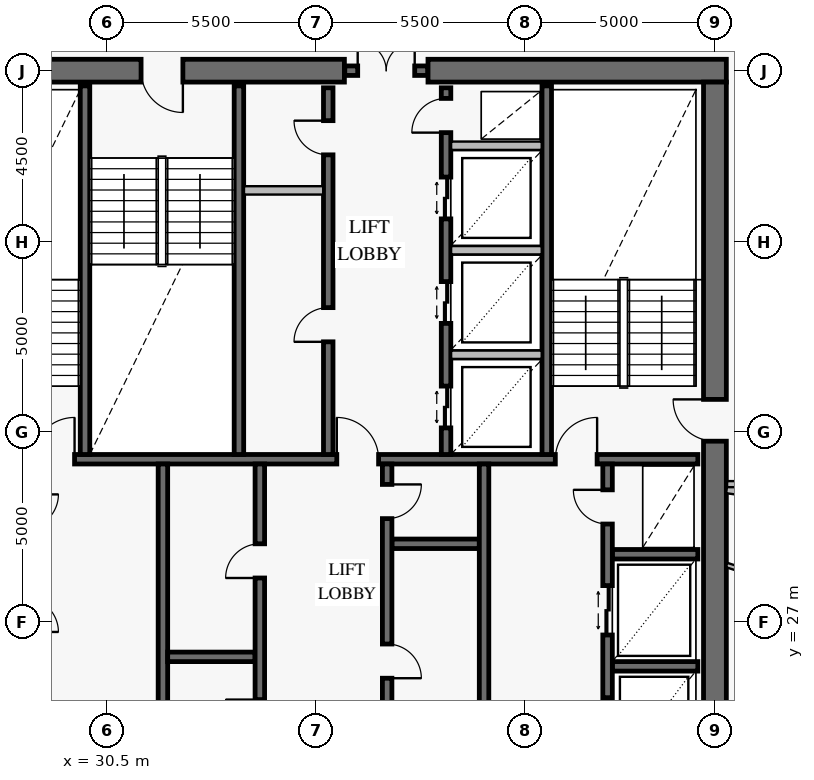
"""IFC4 building model, lengths in metres.
Left out: names, types, materials, properties, quantities, classifications, styles, units other than length and angle.
Written with IfcOpenShell. Run it as: python <this file> out.ifc"""

import sys

from ifc_helpers import new_model, si_unit, direction, frame, frame_2d, origin, place, context, subcontext, project, spatial, rectangle, extrude, element, fill, save


model = new_model("IFC4")
c1 = context("Model", 3, precision=1e-05, world=origin(), true_north=direction((0.0, 1.0)))
c2 = subcontext(c1, "Body", "Model", "MODEL_VIEW")
j1 = project(units=[si_unit("LENGTHUNIT", "METRE"), si_unit("PLANEANGLEUNIT", "RADIAN")], contexts=[c1])
p1 = place(None, origin())
s1 = spatial("IfcSite", under=j1, at=p1, CompositionType="ELEMENT")
p2 = place(p1, origin())
s2 = spatial("IfcBuilding", under=s1, at=p2, CompositionType="ELEMENT")
p3 = place(p2, frame((0.0, 0.0, 231.2)))
s3 = spatial("IfcBuildingStorey", under=s2, at=p3, CompositionType="ELEMENT", Elevation=231.2)
p4 = place(p3, frame((46.8, 41.5, 0.0), z_axis=(0.0, 0.0, 1.0), x_axis=(-1.0, 0.0, 0.0)))
e1 = element("IfcWall", 1, at=p4, inside=s3, PredefinedType="SHEAR", context=c2, shape_type="SweptSolid", body=[
    extrude(rectangle(XDim=7.85, YDim=0.6, at=frame_2d((3.925, 0.0))), origin(), (0.0, 0.0, 1.0), 3.8),
])
p5 = place(p3, frame((36.75, 41.5, 0.0), z_axis=(0.0, 0.0, 1.0), x_axis=(-1.0, 0.0, 0.0)))
e2 = element("IfcWall", 2, at=p5, inside=s3, PredefinedType="SHEAR", context=c2, shape_type="SweptSolid", body=[
    extrude(rectangle(XDim=11.55, YDim=0.6, at=frame_2d((5.775, 0.0))), origin(), (0.0, 0.0, 1.0), 3.8),
])
p6 = place(p5, frame((4.25, 0.0, 0.0)))
e3 = element("IfcOpeningElement", 3, at=p6, cuts=e2, PredefinedType="OPENING", context=c2, shape_type="SweptSolid", body=[
    extrude(rectangle(XDim=1.1, YDim=2.15, at=frame_2d((0.55, 1.075))), frame((0.0, 0.312, 0.0), z_axis=(0.0, -1.0, 0.0), x_axis=(1.0, 0.0, 0.0)), (0.0, 0.0, 1.0), 0.624),
])
p7 = place(p3, frame((46.5, 22.8, 0.0), z_axis=(0.0, 0.0, 1.0), x_axis=(0.0, 1.0, 0.0)))
e4 = element("IfcWall", 4, at=p7, inside=s3, PredefinedType="SHEAR", context=c2, shape_type="SweptSolid", body=[
    extrude(rectangle(XDim=18.4, YDim=0.6, at=frame_2d((9.2, 0.0))), origin(), (0.0, 0.0, 1.0), 3.8),
])
p8 = place(p7, frame((8.95, 0.0, 0.0)))
e5 = element("IfcOpeningElement", 5, at=p8, cuts=e4, PredefinedType="OPENING", context=c2, shape_type="SweptSolid", body=[
    extrude(rectangle(XDim=1.1, YDim=2.15, at=frame_2d((0.55, 1.075))), frame((0.0, 0.312, 0.0), z_axis=(0.0, -1.0, 0.0), x_axis=(1.0, 0.0, 0.0)), (0.0, 0.0, 1.0), 0.624),
])
p9 = place(p3, frame((36.76, 41.5, 0.0), z_axis=(0.0, 0.0, 1.0), x_axis=(1.0, 0.0, 0.0)))
e6 = element("IfcWall", 6, at=p9, inside=s3, PredefinedType="SOLIDWALL", context=c2, shape_type="SweptSolid", body=[
    extrude(rectangle(XDim=2.18, YDim=0.25, at=frame_2d((1.09, 0.0))), origin(), (0.0, 0.0, 1.0), 3.8),
])
p10 = place(p9, frame((0.34, 0.0, 0.0)))
e7 = element("IfcOpeningElement", 7, at=p10, cuts=e6, PredefinedType="OPENING", context=c2, shape_type="SweptSolid", body=[
    extrude(rectangle(XDim=1.5, YDim=2.15, at=frame_2d((0.75, 1.075))), frame((0.0, 0.137, 0.0), z_axis=(0.0, -1.0, 0.0), x_axis=(1.0, 0.0, 0.0)), (0.0, 0.0, 1.0), 0.274),
])
p11 = place(p3, frame((25.95, 31.275, 0.0), z_axis=(0.0, 0.0, 1.0), x_axis=(1.0, 0.0, 0.0)))
e8 = element("IfcWall", 8, at=p11, inside=s3, PredefinedType="SOLIDWALL", context=c2, shape_type="SweptSolid", body=[
    extrude(rectangle(XDim=20.1, YDim=0.25, at=frame_2d((10.05, 0.0))), origin(), (0.0, 0.0, 1.0), 3.8),
])
p12 = place(p11, frame((2.6, 0.0, 0.0)))
e9 = element("IfcOpeningElement", 9, at=p12, cuts=e8, PredefinedType="OPENING", context=c2, shape_type="SweptSolid", body=[
    extrude(rectangle(XDim=1.1, YDim=2.15, at=frame_2d((0.55, 1.075))), frame((0.0, 0.137, 0.0), z_axis=(0.0, -1.0, 0.0), x_axis=(1.0, 0.0, 0.0)), (0.0, 0.0, 1.0), 0.274),
])
p13 = place(p11, frame((10.6, 0.0, 0.0)))
e10 = element("IfcOpeningElement", 10, at=p13, cuts=e8, PredefinedType="OPENING", context=c2, shape_type="SweptSolid", body=[
    extrude(rectangle(XDim=1.1, YDim=2.15, at=frame_2d((0.55, 1.075))), frame((0.0, 0.137, 0.0), z_axis=(0.0, -1.0, 0.0), x_axis=(1.0, 0.0, 0.0)), (0.0, 0.0, 1.0), 0.274),
])
p14 = place(p11, frame((16.35, 0.0, 0.0)))
e11 = element("IfcOpeningElement", 11, at=p14, cuts=e8, PredefinedType="OPENING", context=c2, shape_type="SweptSolid", body=[
    extrude(rectangle(XDim=1.1, YDim=2.15, at=frame_2d((0.55, 1.075))), frame((0.0, 0.137, 0.0), z_axis=(0.0, -1.0, 0.0), x_axis=(1.0, 0.0, 0.0)), (0.0, 0.0, 1.0), 0.274),
])
for number, where, z_axis, x_axis in (
    (12, (29.925, 31.4, 0.0), (0.0, 0.0, 1.0), (0.0, 1.0, 0.0)),
    (13, (33.975, 31.4, 0.0), (0.0, 0.0, 1.0), (0.0, 1.0, 0.0)),
    (14, (42.075, 31.4, 0.0), (0.0, 0.0, 1.0), (0.0, 1.0, 0.0)),
):
    element("IfcWall", number, at=place(p3, frame(where, z_axis=z_axis, x_axis=x_axis)), inside=s3, PredefinedType="SOLIDWALL", context=c2, shape_type="SweptSolid", body=[
        extrude(rectangle(XDim=9.7, YDim=0.25, at=frame_2d((4.85, 0.0))), origin(), (0.0, 0.0, 1.0), 3.8),
    ])
p15 = place(p3, frame((36.325, 31.4, 0.0), z_axis=(0.0, 0.0, 1.0), x_axis=(0.0, 1.0, 0.0)))
e15 = element("IfcWall", 15, at=p15, inside=s3, PredefinedType="SOLIDWALL", context=c2, shape_type="SweptSolid", body=[
    extrude(rectangle(XDim=9.65, YDim=0.25, at=frame_2d((4.825, 0.0))), origin(), (0.0, 0.0, 1.0), 3.8),
])
p16 = place(p15, frame((2.965, 0.0, 0.0)))
e16 = element("IfcOpeningElement", 16, at=p16, cuts=e15, PredefinedType="OPENING", context=c2, shape_type="SweptSolid", body=[
    extrude(rectangle(XDim=0.9, YDim=2.1, at=frame_2d((0.45, 1.05))), frame((0.0, 0.137, 0.0), z_axis=(0.0, -1.0, 0.0), x_axis=(1.0, 0.0, 0.0)), (0.0, 0.0, 1.0), 0.274),
])
p17 = place(p15, frame((7.885, 0.0, 0.0)))
e17 = element("IfcOpeningElement", 17, at=p17, cuts=e15, PredefinedType="OPENING", context=c2, shape_type="SweptSolid", body=[
    extrude(rectangle(XDim=0.9, YDim=2.1, at=frame_2d((0.45, 1.05))), frame((0.0, 0.137, 0.0), z_axis=(0.0, -1.0, 0.0), x_axis=(1.0, 0.0, 0.0)), (0.0, 0.0, 1.0), 0.274),
])
p18 = place(p3, frame((39.425, 31.4, 0.0), z_axis=(0.0, 0.0, 1.0), x_axis=(0.0, 1.0, 0.0)))
e18 = element("IfcWall", 18, at=p18, inside=s3, PredefinedType="SOLIDWALL", context=c2, shape_type="SweptSolid", body=[
    extrude(rectangle(XDim=9.65, YDim=0.25, at=frame_2d((4.825, 0.0))), origin(), (0.0, 0.0, 1.0), 3.8),
])
p19 = place(p18, frame((0.7, 0.0, 0.0)))
e19 = element("IfcOpeningElement", 19, at=p19, cuts=e18, PredefinedType="OPENING", context=c2, shape_type="SweptSolid", body=[
    extrude(rectangle(XDim=1.1, YDim=2.2, at=frame_2d((0.55, 1.1))), frame((0.0, 0.137, 0.0), z_axis=(0.0, -1.0, 0.0), x_axis=(1.0, 0.0, 0.0)), (0.0, 0.0, 1.0), 0.274),
])
p20 = place(p18, frame((3.45, 0.0, 0.0)))
e20 = element("IfcOpeningElement", 20, at=p20, cuts=e18, PredefinedType="OPENING", context=c2, shape_type="SweptSolid", body=[
    extrude(rectangle(XDim=1.1, YDim=2.2, at=frame_2d((0.55, 1.1))), frame((0.0, 0.137, 0.0), z_axis=(0.0, -1.0, 0.0), x_axis=(1.0, 0.0, 0.0)), (0.0, 0.0, 1.0), 0.274),
])
p21 = place(p18, frame((6.2, 0.0, 0.0)))
e21 = element("IfcOpeningElement", 21, at=p21, cuts=e18, PredefinedType="OPENING", context=c2, shape_type="SweptSolid", body=[
    extrude(rectangle(XDim=1.1, YDim=2.2, at=frame_2d((0.55, 1.1))), frame((0.0, 0.137, 0.0), z_axis=(0.0, -1.0, 0.0), x_axis=(1.0, 0.0, 0.0)), (0.0, 0.0, 1.0), 0.274),
])
p22 = place(p18, frame((8.47, 0.0, 0.0)))
e22 = element("IfcOpeningElement", 22, at=p22, cuts=e18, PredefinedType="OPENING", context=c2, shape_type="SweptSolid", body=[
    extrude(rectangle(XDim=0.9, YDim=2.1, at=frame_2d((0.45, 1.05))), frame((0.0, 0.137, 0.0), z_axis=(0.0, -1.0, 0.0), x_axis=(1.0, 0.0, 0.0)), (0.0, 0.0, 1.0), 0.274),
])
p23 = place(p3, frame((31.975, 22.95, 0.0), z_axis=(0.0, 0.0, 1.0), x_axis=(0.0, 1.0, 0.0)))
e23 = element("IfcWall", 23, at=p23, inside=s3, PredefinedType="SOLIDWALL", context=c2, shape_type="SweptSolid", body=[
    extrude(rectangle(XDim=8.2, YDim=0.25, at=frame_2d((4.1, 0.0))), origin(), (0.0, 0.0, 1.0), 3.8),
])
p24 = place(p3, frame((32.1, 26.075, 0.0), z_axis=(0.0, 0.0, 1.0), x_axis=(1.0, 0.0, 0.0)))
e24 = element("IfcWall", 24, at=p24, inside=s3, PredefinedType="SOLIDWALL", context=c2, shape_type="SweptSolid", body=[
    extrude(rectangle(XDim=2.3, YDim=0.25, at=frame_2d((1.15, 0.0))), origin(), (0.0, 0.0, 1.0), 3.8),
])
p25 = place(p3, frame((34.525, 22.95, 0.0), z_axis=(0.0, 0.0, 1.0), x_axis=(0.0, 1.0, 0.0)))
e25 = element("IfcWall", 25, at=p25, inside=s3, PredefinedType="SOLIDWALL", context=c2, shape_type="SweptSolid", body=[
    extrude(rectangle(XDim=8.2, YDim=0.25, at=frame_2d((4.1, 0.0))), origin(), (0.0, 0.0, 1.0), 3.8),
])
p26 = place(p25, frame((1.1, 0.0, 0.0)))
e26 = element("IfcOpeningElement", 26, at=p26, cuts=e25, PredefinedType="OPENING", context=c2, shape_type="SweptSolid", body=[
    extrude(rectangle(XDim=0.9, YDim=2.1, at=frame_2d((0.45, 1.05))), frame((0.0, 0.137, 0.0), z_axis=(0.0, -1.0, 0.0), x_axis=(1.0, 0.0, 0.0)), (0.0, 0.0, 1.0), 0.274),
])
p27 = place(p25, frame((5.2, 0.0, 0.0)))
e27 = element("IfcOpeningElement", 27, at=p27, cuts=e25, PredefinedType="OPENING", context=c2, shape_type="SweptSolid", body=[
    extrude(rectangle(XDim=0.9, YDim=2.1, at=frame_2d((0.45, 1.05))), frame((0.0, 0.137, 0.0), z_axis=(0.0, -1.0, 0.0), x_axis=(1.0, 0.0, 0.0)), (0.0, 0.0, 1.0), 0.274),
])
p28 = place(p3, frame((38.0, 29.05, 0.0), z_axis=(0.0, 0.0, 1.0), x_axis=(1.0, 0.0, 0.0)))
e28 = element("IfcWall", 28, at=p28, inside=s3, PredefinedType="SOLIDWALL", context=c2, shape_type="SweptSolid", body=[
    extrude(rectangle(XDim=2.3, YDim=0.25, at=frame_2d((1.15, 0.0))), origin(), (0.0, 0.0, 1.0), 3.8),
])
p29 = place(p3, frame((37.875, 22.95, 0.0), z_axis=(0.0, 0.0, 1.0), x_axis=(0.0, 1.0, 0.0)))
e29 = element("IfcWall", 29, at=p29, inside=s3, PredefinedType="SOLIDWALL", context=c2, shape_type="SweptSolid", body=[
    extrude(rectangle(XDim=8.2, YDim=0.25, at=frame_2d((4.1, 0.0))), origin(), (0.0, 0.0, 1.0), 3.8),
])
p30 = place(p29, frame((2.562, 0.0, 0.0)))
e30 = element("IfcOpeningElement", 30, at=p30, cuts=e29, PredefinedType="OPENING", context=c2, shape_type="SweptSolid", body=[
    extrude(rectangle(XDim=0.9, YDim=2.1, at=frame_2d((0.45, 1.05))), frame((0.0, 0.137, 0.0), z_axis=(0.0, -1.0, 0.0), x_axis=(1.0, 0.0, 0.0)), (0.0, 0.0, 1.0), 0.274),
])
p31 = place(p29, frame((6.762, 0.0, 0.0)))
e31 = element("IfcOpeningElement", 31, at=p31, cuts=e29, PredefinedType="OPENING", context=c2, shape_type="SweptSolid", body=[
    extrude(rectangle(XDim=0.9, YDim=2.1, at=frame_2d((0.45, 1.05))), frame((0.0, 0.137, 0.0), z_axis=(0.0, -1.0, 0.0), x_axis=(1.0, 0.0, 0.0)), (0.0, 0.0, 1.0), 0.274),
])
p32 = place(p3, frame((40.425, 22.95, 0.0), z_axis=(0.0, 0.0, 1.0), x_axis=(0.0, 1.0, 0.0)))
e32 = element("IfcWall", 32, at=p32, inside=s3, PredefinedType="SOLIDWALL", context=c2, shape_type="SweptSolid", body=[
    extrude(rectangle(XDim=8.2, YDim=0.25, at=frame_2d((4.1, 0.0))), origin(), (0.0, 0.0, 1.0), 3.8),
])
for number, where, z_axis, x_axis in (
    (33, (43.8, 25.825, 0.0), (0.0, 0.0, 1.0), (1.0, 0.0, 0.0)),
    (34, (43.8, 28.775, 0.0), (0.0, 0.0, 1.0), (1.0, 0.0, 0.0)),
):
    element("IfcWall", number, at=place(p3, frame(where, z_axis=z_axis, x_axis=x_axis)), inside=s3, PredefinedType="SOLIDWALL", context=c2, shape_type="SweptSolid", body=[
        extrude(rectangle(XDim=2.25, YDim=0.25, at=frame_2d((1.125, 0.0))), origin(), (0.0, 0.0, 1.0), 3.8),
    ])
p33 = place(p3, frame((43.675, 22.95, 0.0), z_axis=(0.0, 0.0, 1.0), x_axis=(0.0, 1.0, 0.0)))
e35 = element("IfcWall", 35, at=p33, inside=s3, PredefinedType="SOLIDWALL", context=c2, shape_type="SweptSolid", body=[
    extrude(rectangle(XDim=8.2, YDim=0.25, at=frame_2d((4.1, 0.0))), origin(), (0.0, 0.0, 1.0), 3.8),
])
p34 = place(p33, frame((0.75, 0.0, 0.0)))
e36 = element("IfcOpeningElement", 36, at=p34, cuts=e35, PredefinedType="OPENING", context=c2, shape_type="SweptSolid", body=[
    extrude(rectangle(XDim=1.3, YDim=2.3, at=frame_2d((0.65, 1.15))), frame((0.0, 0.137, 0.0), z_axis=(0.0, -1.0, 0.0), x_axis=(1.0, 0.0, 0.0)), (0.0, 0.0, 1.0), 0.274),
])
p35 = place(p33, frame((3.7, 0.0, 0.0)))
e37 = element("IfcOpeningElement", 37, at=p35, cuts=e35, PredefinedType="OPENING", context=c2, shape_type="SweptSolid", body=[
    extrude(rectangle(XDim=1.3, YDim=2.3, at=frame_2d((0.65, 1.15))), frame((0.0, 0.137, 0.0), z_axis=(0.0, -1.0, 0.0), x_axis=(1.0, 0.0, 0.0)), (0.0, 0.0, 1.0), 0.274),
])
p36 = place(p33, frame((6.62, 0.0, 0.0)))
e38 = element("IfcOpeningElement", 38, at=p36, cuts=e35, PredefinedType="OPENING", context=c2, shape_type="SweptSolid", body=[
    extrude(rectangle(XDim=0.9, YDim=2.1, at=frame_2d((0.45, 1.05))), frame((0.0, 0.137, 0.0), z_axis=(0.0, -1.0, 0.0), x_axis=(1.0, 0.0, 0.0)), (0.0, 0.0, 1.0), 0.274),
])
p37 = place(p3, frame((34.108, 38.35, 0.0), z_axis=(0.0, 0.0, 1.0), x_axis=(1.0, 0.0, 0.0)))
e39 = element("IfcWall", 39, at=p37, inside=s3, PredefinedType="PARTITIONING", context=c2, shape_type="SweptSolid", body=[
    extrude(rectangle(XDim=2.084, YDim=0.22, at=frame_2d((1.042, 0.0))), origin(), (0.0, 0.0, 1.0), 3.55),
])
for number, where, z_axis, x_axis in (
    (40, (39.558, 34.025, 0.0), (0.0, 0.0, 1.0), (1.0, 0.0, 0.0)),
    (41, (39.558, 36.775, 0.0), (0.0, 0.0, 1.0), (1.0, 0.0, 0.0)),
    (42, (39.558, 39.525, 0.0), (0.0, 0.0, 1.0), (1.0, 0.0, 0.0)),
):
    element("IfcWall", number, at=place(p3, frame(where, z_axis=z_axis, x_axis=x_axis)), inside=s3, PredefinedType="PARTITIONING", context=c2, shape_type="SweptSolid", body=[
        extrude(rectangle(XDim=2.384, YDim=0.22, at=frame_2d((1.192, 0.0))), origin(), (0.0, 0.0, 1.0), 3.55),
    ])
p38 = place(p3, frame((46.808, 28.491, 0.0), z_axis=(0.0, 0.0, 1.0), x_axis=(0.951120145706, -0.308821094538, 0.0)))
e43 = element("IfcWall", 43, at=p38, inside=s3, PredefinedType="PARTITIONING", context=c2, shape_type="SweptSolid", body=[
    extrude(rectangle(XDim=3.0, YDim=0.12, at=frame_2d((1.5, 0.0))), origin(), (0.0, 0.0, 1.0), 3.55),
])
p39 = place(p3, frame((46.808, 30.481, 0.0), z_axis=(0.0, 0.0, 1.0), x_axis=(0.990266776737, -0.139182293739, 0.0)))
e44 = element("IfcWall", 44, at=p39, inside=s3, PredefinedType="PARTITIONING", context=c2, shape_type="SweptSolid", body=[
    extrude(rectangle(XDim=16.657, YDim=0.2, at=frame_2d((8.329, 0.0))), origin(), (0.0, 0.0, 1.0), 2.93),
])
p40 = place(p3, frame((46.82, 30.62, 0.0), z_axis=(0.0, 0.0, 1.0), x_axis=(1.0, 0.0, 0.0)))
e45 = element("IfcWall", 45, at=p40, inside=s3, PredefinedType="PARTITIONING", context=c2, shape_type="SweptSolid", body=[
    extrude(rectangle(XDim=2.03, YDim=0.16, at=frame_2d((1.015, 0.0))), origin(), (0.0, 0.0, 1.0), 3.55),
])
p41 = place(p8, origin())
e46 = element("IfcDoor", 46, at=p41, inside=s3, OperationType="SINGLE_SWING_RIGHT", PredefinedType="USERDEFINED", context=c2, shape_type="SweptSolid", body=[
    extrude(rectangle(XDim=1.1, YDim=2.15, at=frame_2d((0.55, 1.075))), frame((0.0, 0.025, 0.0), z_axis=(0.0, -1.0, 0.0), x_axis=(1.0, 0.0, 0.0)), (0.0, 0.0, 1.0), 0.05),
])
fill(e5, e46)
p42 = place(p6, origin())
e47 = element("IfcDoor", 47, at=p42, inside=s3, OperationType="SINGLE_SWING_LEFT", PredefinedType="USERDEFINED", context=c2, shape_type="SweptSolid", body=[
    extrude(rectangle(XDim=1.1, YDim=2.15, at=frame_2d((0.55, 1.075))), frame((0.0, 0.025, 0.0), z_axis=(0.0, -1.0, 0.0), x_axis=(1.0, 0.0, 0.0)), (0.0, 0.0, 1.0), 0.05),
])
fill(e3, e47)
p43 = place(p10, origin())
e48 = element("IfcDoor", 48, at=p43, inside=s3, OperationType="DOUBLE_DOOR_SINGLE_SWING", PredefinedType="DOOR", context=c2, shape_type="SweptSolid", body=[
    extrude(rectangle(XDim=1.5, YDim=2.15, at=frame_2d((0.75, 1.075))), frame((0.0, 0.025, 0.0), z_axis=(0.0, -1.0, 0.0), x_axis=(1.0, 0.0, 0.0)), (0.0, 0.0, 1.0), 0.05),
])
fill(e7, e48)
p44 = place(p12, origin())
e49 = element("IfcDoor", 49, at=p44, inside=s3, OperationType="SINGLE_SWING_RIGHT", PredefinedType="USERDEFINED", context=c2, shape_type="SweptSolid", body=[
    extrude(rectangle(XDim=1.1, YDim=2.15, at=frame_2d((0.55, 1.075))), frame((0.0, 0.025, 0.0), z_axis=(0.0, -1.0, 0.0), x_axis=(1.0, 0.0, 0.0)), (0.0, 0.0, 1.0), 0.05),
])
fill(e9, e49)
p45 = place(p13, origin())
e50 = element("IfcDoor", 50, at=p45, inside=s3, OperationType="SINGLE_SWING_LEFT", PredefinedType="USERDEFINED", context=c2, shape_type="SweptSolid", body=[
    extrude(rectangle(XDim=1.1, YDim=2.15, at=frame_2d((0.55, 1.075))), frame((0.0, 0.025, 0.0), z_axis=(0.0, -1.0, 0.0), x_axis=(1.0, 0.0, 0.0)), (0.0, 0.0, 1.0), 0.05),
])
fill(e10, e50)
p46 = place(p14, origin())
e51 = element("IfcDoor", 51, at=p46, inside=s3, OperationType="SINGLE_SWING_RIGHT", PredefinedType="USERDEFINED", context=c2, shape_type="SweptSolid", body=[
    extrude(rectangle(XDim=1.1, YDim=2.15, at=frame_2d((0.55, 1.075))), frame((0.0, 0.025, 0.0), z_axis=(0.0, -1.0, 0.0), x_axis=(1.0, 0.0, 0.0)), (0.0, 0.0, 1.0), 0.05),
])
fill(e11, e51)
p47 = place(p16, origin())
e52 = element("IfcDoor", 52, at=p47, inside=s3, OperationType="SINGLE_SWING_LEFT", PredefinedType="DOOR", context=c2, shape_type="SweptSolid", body=[
    extrude(rectangle(XDim=0.9, YDim=2.1, at=frame_2d((0.45, 1.05))), frame((0.0, 0.025, 0.0), z_axis=(0.0, -1.0, 0.0), x_axis=(1.0, 0.0, 0.0)), (0.0, 0.0, 1.0), 0.05),
])
fill(e16, e52)
p48 = place(p17, origin())
e53 = element("IfcDoor", 53, at=p48, inside=s3, OperationType="SINGLE_SWING_RIGHT", PredefinedType="DOOR", context=c2, shape_type="SweptSolid", body=[
    extrude(rectangle(XDim=0.9, YDim=2.1, at=frame_2d((0.45, 1.05))), frame((0.0, 0.025, 0.0), z_axis=(0.0, -1.0, 0.0), x_axis=(1.0, 0.0, 0.0)), (0.0, 0.0, 1.0), 0.05),
])
fill(e17, e53)
p49 = place(p19, origin())
e54 = element("IfcDoor", 54, at=p49, inside=s3, OperationType="DOUBLE_DOOR_SLIDING", PredefinedType="DOOR", context=c2, shape_type="SweptSolid", body=[
    extrude(rectangle(XDim=1.1, YDim=2.2, at=frame_2d((0.55, 1.1))), frame((0.0, 0.025, 0.0), z_axis=(0.0, -1.0, 0.0), x_axis=(1.0, 0.0, 0.0)), (0.0, 0.0, 1.0), 0.05),
])
fill(e19, e54)
p50 = place(p20, origin())
e55 = element("IfcDoor", 55, at=p50, inside=s3, OperationType="DOUBLE_DOOR_SLIDING", PredefinedType="DOOR", context=c2, shape_type="SweptSolid", body=[
    extrude(rectangle(XDim=1.1, YDim=2.2, at=frame_2d((0.55, 1.1))), frame((0.0, 0.025, 0.0), z_axis=(0.0, -1.0, 0.0), x_axis=(1.0, 0.0, 0.0)), (0.0, 0.0, 1.0), 0.05),
])
fill(e20, e55)
p51 = place(p21, origin())
e56 = element("IfcDoor", 56, at=p51, inside=s3, OperationType="DOUBLE_DOOR_SLIDING", PredefinedType="DOOR", context=c2, shape_type="SweptSolid", body=[
    extrude(rectangle(XDim=1.1, YDim=2.2, at=frame_2d((0.55, 1.1))), frame((0.0, 0.025, 0.0), z_axis=(0.0, -1.0, 0.0), x_axis=(1.0, 0.0, 0.0)), (0.0, 0.0, 1.0), 0.05),
])
fill(e21, e56)
p52 = place(p22, origin())
e57 = element("IfcDoor", 57, at=p52, inside=s3, OperationType="SINGLE_SWING_LEFT", PredefinedType="DOOR", context=c2, shape_type="SweptSolid", body=[
    extrude(rectangle(XDim=0.9, YDim=2.1, at=frame_2d((0.45, 1.05))), frame((0.0, 0.025, 0.0), z_axis=(0.0, -1.0, 0.0), x_axis=(1.0, 0.0, 0.0)), (0.0, 0.0, 1.0), 0.05),
])
fill(e22, e57)
p53 = place(p27, origin())
e58 = element("IfcDoor", 58, at=p53, inside=s3, OperationType="SINGLE_SWING_LEFT", PredefinedType="DOOR", context=c2, shape_type="SweptSolid", body=[
    extrude(rectangle(XDim=0.9, YDim=2.1, at=frame_2d((0.45, 1.05))), frame((0.0, 0.025, 0.0), z_axis=(0.0, -1.0, 0.0), x_axis=(1.0, 0.0, 0.0)), (0.0, 0.0, 1.0), 0.05),
])
fill(e27, e58)
p54 = place(p30, frame((0.9, 0.0, 0.0), z_axis=(0.0, 0.0, 1.0), x_axis=(-1.0, 0.0, 0.0)))
e59 = element("IfcDoor", 59, at=p54, inside=s3, OperationType="SINGLE_SWING_RIGHT", PredefinedType="DOOR", context=c2, shape_type="SweptSolid", body=[
    extrude(rectangle(XDim=0.9, YDim=2.1, at=frame_2d((0.45, 1.05))), frame((0.0, 0.025, 0.0), z_axis=(0.0, -1.0, 0.0), x_axis=(1.0, 0.0, 0.0)), (0.0, 0.0, 1.0), 0.05),
])
fill(e30, e59)
p55 = place(p31, frame((0.9, 0.0, 0.0), z_axis=(0.0, 0.0, 1.0), x_axis=(-1.0, 0.0, 0.0)))
e60 = element("IfcDoor", 60, at=p55, inside=s3, OperationType="SINGLE_SWING_LEFT", PredefinedType="DOOR", context=c2, shape_type="SweptSolid", body=[
    extrude(rectangle(XDim=0.9, YDim=2.1, at=frame_2d((0.45, 1.05))), frame((0.0, 0.025, 0.0), z_axis=(0.0, -1.0, 0.0), x_axis=(1.0, 0.0, 0.0)), (0.0, 0.0, 1.0), 0.05),
])
fill(e31, e60)
p56 = place(p34, origin())
e61 = element("IfcDoor", 61, at=p56, inside=s3, OperationType="DOUBLE_DOOR_SLIDING", PredefinedType="DOOR", context=c2, shape_type="SweptSolid", body=[
    extrude(rectangle(XDim=1.3, YDim=2.3, at=frame_2d((0.65, 1.15))), frame((0.0, 0.025, 0.0), z_axis=(0.0, -1.0, 0.0), x_axis=(1.0, 0.0, 0.0)), (0.0, 0.0, 1.0), 0.05),
])
fill(e36, e61)
p57 = place(p35, origin())
e62 = element("IfcDoor", 62, at=p57, inside=s3, OperationType="DOUBLE_DOOR_SLIDING", PredefinedType="DOOR", context=c2, shape_type="SweptSolid", body=[
    extrude(rectangle(XDim=1.3, YDim=2.3, at=frame_2d((0.65, 1.15))), frame((0.0, 0.025, 0.0), z_axis=(0.0, -1.0, 0.0), x_axis=(1.0, 0.0, 0.0)), (0.0, 0.0, 1.0), 0.05),
])
fill(e37, e62)
p58 = place(p36, origin())
e63 = element("IfcDoor", 63, at=p58, inside=s3, OperationType="SINGLE_SWING_RIGHT", PredefinedType="DOOR", context=c2, shape_type="SweptSolid", body=[
    extrude(rectangle(XDim=0.9, YDim=2.1, at=frame_2d((0.45, 1.05))), frame((0.0, 0.025, 0.0), z_axis=(0.0, -1.0, 0.0), x_axis=(1.0, 0.0, 0.0)), (0.0, 0.0, 1.0), 0.05),
])
fill(e38, e63)
save(model, sys.argv[1])
